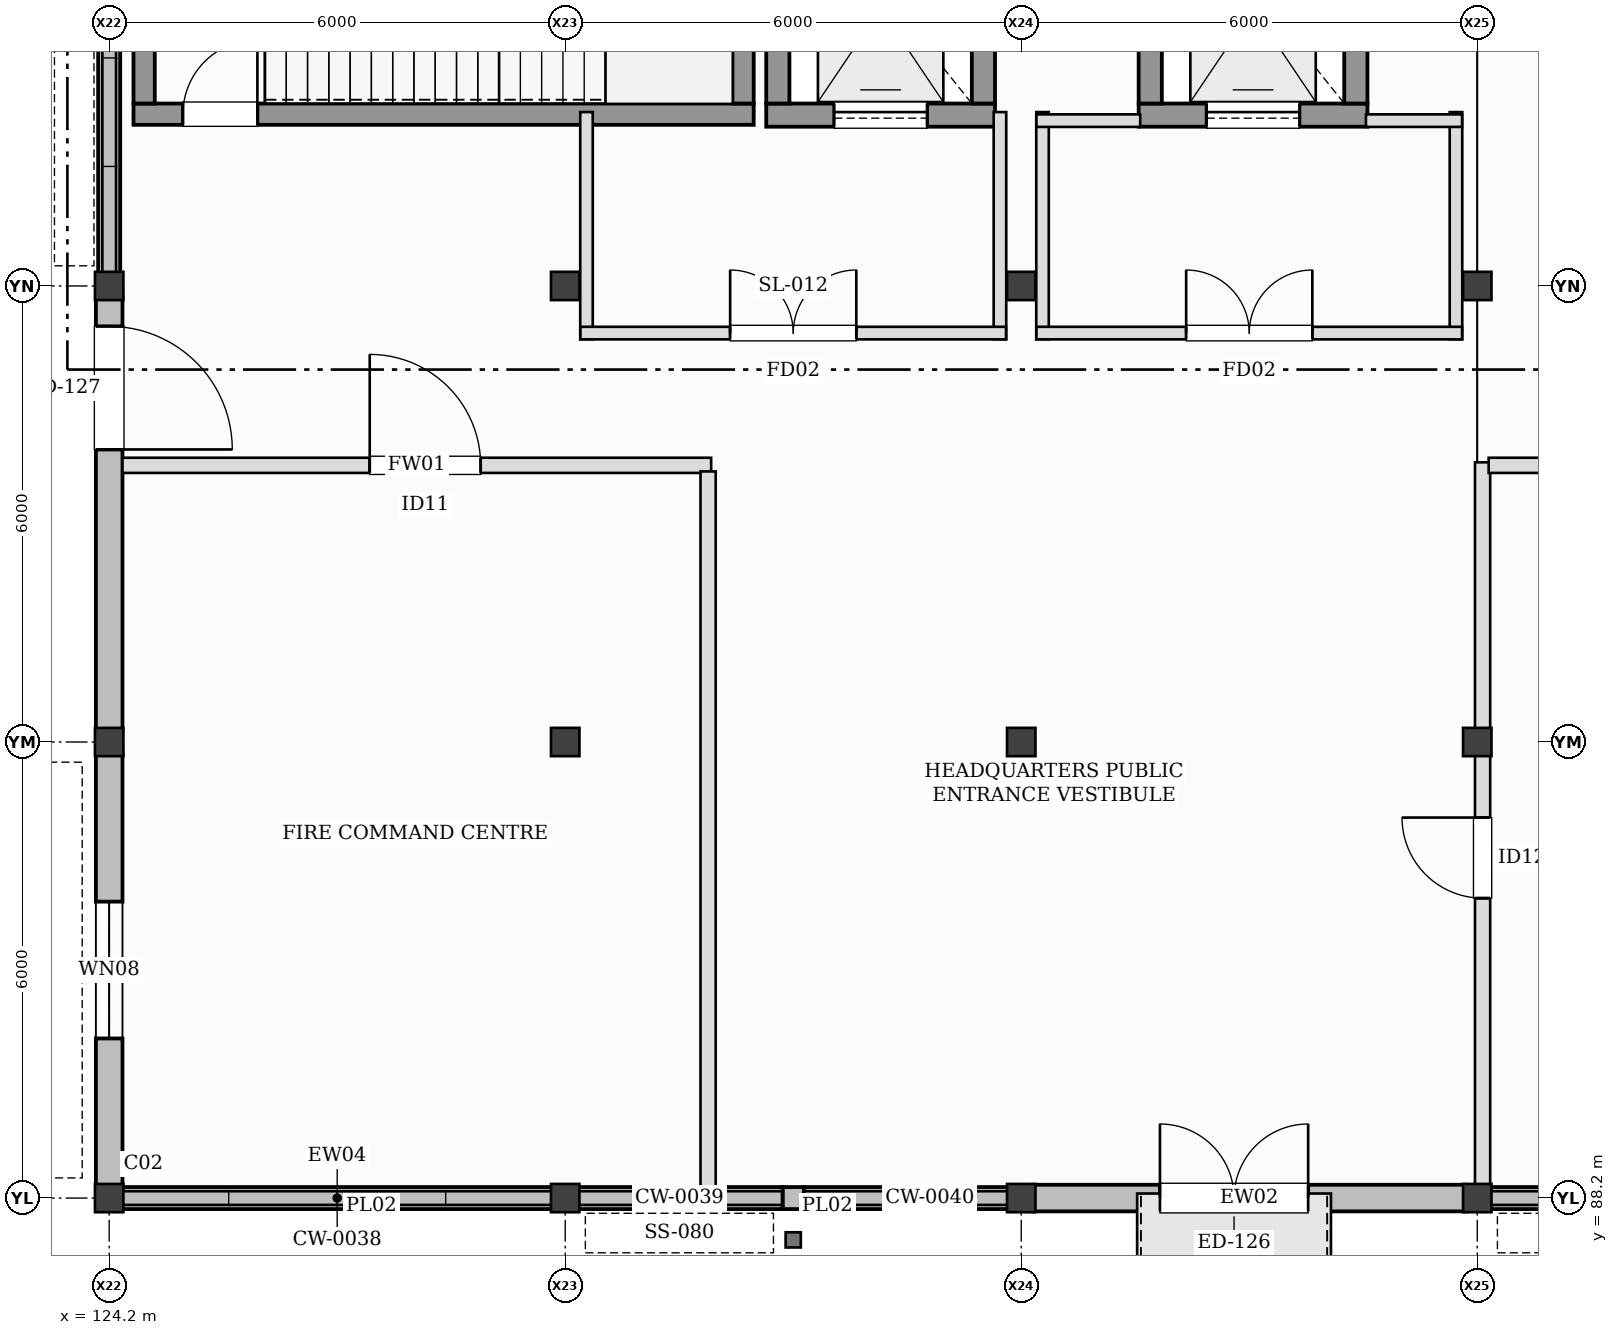
"""IFC4 building model, lengths in metres.
Left out: names, types, materials, properties, quantities, classifications, styles, units other than length and angle.
Written with IfcOpenShell. Run it as: python <this file> out.ifc"""

import sys

from ifc_helpers import new_model, si_unit, direction, frame, frame_2d, origin, origin_2d, place, context, subcontext, project, spatial, rectangle, hollow_rectangle, i_section, extrude, element, fill, save


model = new_model("IFC4")
c1 = context("Model", 3, precision=1e-05, world=origin(), true_north=direction((0.0, 1.0)))
c2 = subcontext(c1, "Body", "Model", "MODEL_VIEW")
j1 = project(units=[si_unit("LENGTHUNIT", "METRE"), si_unit("PLANEANGLEUNIT", "RADIAN")], contexts=[c1])
p1 = place(None, origin())
s1 = spatial("IfcSite", under=j1, at=p1, CompositionType="ELEMENT")
p2 = place(p1, origin())
s2 = spatial("IfcBuilding", under=s1, at=p2, CompositionType="ELEMENT")
p3 = place(p2, origin())
s3 = spatial("IfcBuildingStorey", under=s2, at=p3, CompositionType="ELEMENT", Elevation=0.0)
for number, where, z_axis, x_axis in (
    (1, (124.2, 88.2, 0.0), (0.0, 0.0, 1.0), (1.0, 0.0, 0.0)),
    (2, (124.2, 94.2, 0.0), (0.0, 0.0, 1.0), (1.0, 0.0, 0.0)),
    (3, (124.2, 100.2, 0.0), (0.0, 0.0, 1.0), (1.0, 0.0, 0.0)),
    (4, (130.2, 88.2, 0.0), (0.0, 0.0, 1.0), (1.0, 0.0, 0.0)),
    (5, (130.2, 94.2, 0.0), (0.0, 0.0, 1.0), (1.0, 0.0, 0.0)),
    (6, (130.2, 100.2, 0.0), (0.0, 0.0, 1.0), (1.0, 0.0, 0.0)),
    (7, (136.2, 88.2, 0.0), (0.0, 0.0, 1.0), (1.0, 0.0, 0.0)),
    (8, (136.2, 94.2, 0.0), (0.0, 0.0, 1.0), (1.0, 0.0, 0.0)),
    (9, (136.2, 100.2, 0.0), (0.0, 0.0, 1.0), (1.0, 0.0, 0.0)),
    (10, (142.2, 88.2, 0.0), (0.0, 0.0, 1.0), (1.0, 0.0, 0.0)),
    (11, (142.2, 94.2, 0.0), (0.0, 0.0, 1.0), (1.0, 0.0, 0.0)),
    (12, (142.2, 100.2, 0.0), (0.0, 0.0, 1.0), (1.0, 0.0, 0.0)),
):
    element("IfcColumn", number, at=place(p3, frame(where, z_axis=z_axis, x_axis=x_axis)), inside=s3, PredefinedType="COLUMN", context=c2, shape_type="SweptSolid", body=[
        extrude(i_section(OverallWidth=0.374, OverallDepth=0.372, WebThickness=0.016, FlangeThickness=0.026, at=origin_2d()), origin(), (0.0, 0.0, 1.0), 6.0),
    ])
for number, where, z_axis, x_axis in (
    (13, (127.2, 87.65, -0.35), (0.0, 0.0, 1.0), (1.0, 0.0, 0.0)),
    (14, (133.2, 87.65, -0.35), (0.0, 0.0, 1.0), (1.0, 0.0, 0.0)),
):
    element("IfcColumn", number, at=place(p3, frame(where, z_axis=z_axis, x_axis=x_axis)), inside=s3, PredefinedType="PILASTER", context=c2, shape_type="SweptSolid", body=[
        extrude(hollow_rectangle(XDim=0.2, YDim=0.2, WallThickness=0.01, at=origin_2d()), origin(), (0.0, 0.0, 1.0), 6.35),
    ])
p4 = place(p3, frame((124.345, 88.2, 0.0), z_axis=(0.0, 0.0, 1.0), x_axis=(1.0, 0.0, 0.0)))
e15 = element("IfcWall", 15, at=p4, inside=s3, PredefinedType="STANDARD", context=c2, shape_type="SweptSolid", body=[
    extrude(rectangle(XDim=5.71, YDim=0.29, at=frame_2d((2.855, 0.0))), origin(), (0.0, 0.0, 1.0), 0.68),
])
p5 = place(p3, frame((133.06, 88.2, 0.0), z_axis=(0.0, 0.0, 1.0), x_axis=(1.0, 0.0, 0.0)))
e16 = element("IfcWall", 16, at=p5, inside=s3, PredefinedType="STANDARD", context=c2, shape_type="SweptSolid", body=[
    extrude(rectangle(XDim=0.28, YDim=0.29, at=frame_2d((0.14, 0.0))), origin(), (0.0, 0.0, 1.0), 5.113),
])
p6 = place(p3, frame((130.345, 88.2, 0.0), z_axis=(0.0, 0.0, 1.0), x_axis=(1.0, 0.0, 0.0)))
e17 = element("IfcWall", 17, at=p6, inside=s3, PredefinedType="STANDARD", context=c2, shape_type="SweptSolid", body=[
    extrude(rectangle(XDim=2.715, YDim=0.29, at=frame_2d((1.357, 0.0))), origin(), (0.0, 0.0, 1.0), 0.8),
])
p7 = place(p3, frame((133.34, 88.2, 0.0), z_axis=(0.0, 0.0, 1.0), x_axis=(1.0, 0.0, 0.0)))
e18 = element("IfcWall", 18, at=p7, inside=s3, PredefinedType="STANDARD", context=c2, shape_type="SweptSolid", body=[
    extrude(rectangle(XDim=2.715, YDim=0.29, at=frame_2d((1.357, 0.0))), origin(), (0.0, 0.0, 1.0), 0.92),
])
p8 = place(p3, frame((136.345, 88.2, 0.0), z_axis=(0.0, 0.0, 1.0), x_axis=(1.0, 0.0, 0.0)))
e19 = element("IfcWall", 19, at=p8, inside=s3, PredefinedType="STANDARD", context=c2, shape_type="SweptSolid", body=[
    extrude(rectangle(XDim=5.71, YDim=0.35, at=frame_2d((2.855, 0.0))), origin(), (0.0, 0.0, 1.0), 5.113),
])
p9 = place(p8, frame((1.68, 0.0, 0.0)))
e20 = element("IfcOpeningElement", 20, at=p9, cuts=e19, PredefinedType="OPENING", context=c2, shape_type="SweptSolid", body=[
    extrude(rectangle(XDim=1.95, YDim=2.35, at=frame_2d((0.975, 1.175))), frame((0.0, 0.185, 0.0), z_axis=(0.0, -1.0, 0.0), x_axis=(1.0, 0.0, 0.0)), (0.0, 0.0, 1.0), 0.37),
])
p10 = place(p3, frame((142.345, 88.2, 0.0), z_axis=(0.0, 0.0, 1.0), x_axis=(1.0, 0.0, 0.0)))
e21 = element("IfcWall", 21, at=p10, inside=s3, PredefinedType="STANDARD", context=c2, shape_type="SweptSolid", body=[
    extrude(rectangle(XDim=2.715, YDim=0.29, at=frame_2d((1.357, 0.0))), origin(), (0.0, 0.0, 1.0), 0.32),
])
p11 = place(p3, frame((124.2, 94.055, 0.0), z_axis=(0.0, 0.0, 1.0), x_axis=(0.0, -1.0, 0.0)))
e22 = element("IfcWall", 22, at=p11, inside=s3, PredefinedType="STANDARD", context=c2, shape_type="SweptSolid", body=[
    extrude(rectangle(XDim=5.71, YDim=0.35, at=frame_2d((2.855, 0.0))), origin(), (0.0, 0.0, 1.0), 5.044),
])
p12 = place(p11, frame((1.955, 0.0, 1.0)))
e23 = element("IfcOpeningElement", 23, at=p12, cuts=e22, PredefinedType="OPENING", context=c2, shape_type="SweptSolid", body=[
    extrude(rectangle(XDim=1.8, YDim=1.36, at=frame_2d((0.9, 0.68))), frame((0.0, 0.185, 0.0), z_axis=(0.0, -1.0, 0.0), x_axis=(1.0, 0.0, 0.0)), (0.0, 0.0, 1.0), 0.37),
])
p13 = place(p3, frame((124.2, 100.055, 0.0), z_axis=(0.0, 0.0, 1.0), x_axis=(0.0, -1.0, 0.0)))
e24 = element("IfcWall", 24, at=p13, inside=s3, PredefinedType="STANDARD", context=c2, shape_type="SweptSolid", body=[
    extrude(rectangle(XDim=5.71, YDim=0.35, at=frame_2d((2.855, 0.0))), origin(), (0.0, 0.0, 1.0), 5.044),
])
p14 = place(p13, frame((0.386, 0.0, 0.0)))
e25 = element("IfcOpeningElement", 25, at=p14, cuts=e24, PredefinedType="OPENING", context=c2, shape_type="SweptSolid", body=[
    extrude(rectangle(XDim=1.62, YDim=2.2, at=frame_2d((0.81, 1.1))), frame((0.0, 0.185, 0.0), z_axis=(0.0, -1.0, 0.0), x_axis=(1.0, 0.0, 0.0)), (0.0, 0.0, 1.0), 0.37),
])
p15 = place(p3, frame((124.2, 106.055, 0.0), z_axis=(0.0, 0.0, 1.0), x_axis=(0.0, -1.0, 0.0)))
e26 = element("IfcWall", 26, at=p15, inside=s3, PredefinedType="STANDARD", context=c2, shape_type="SweptSolid", body=[
    extrude(rectangle(XDim=5.71, YDim=0.29, at=frame_2d((2.855, 0.0))), origin(), (0.0, 0.0, 1.0), 0.56),
])
p16 = place(p3, frame((124.52, 102.46, 0.0), z_axis=(0.0, 0.0, 1.0), x_axis=(1.0, 0.0, 0.0)))
e27 = element("IfcWall", 27, at=p16, inside=s3, PredefinedType="SHEAR", context=c2, shape_type="SweptSolid", body=[
    extrude(rectangle(XDim=8.16, YDim=0.28, at=frame_2d((4.08, 0.0))), origin(), (0.0, 0.0, 1.0), 6.0),
])
p17 = place(p16, frame((0.65, 0.0, 0.0)))
e28 = element("IfcOpeningElement", 28, at=p17, cuts=e27, PredefinedType="OPENING", context=c2, shape_type="SweptSolid", body=[
    extrude(rectangle(XDim=0.98, YDim=2.15, at=frame_2d((0.49, 1.075))), frame((0.0, 0.15, 0.0), z_axis=(0.0, -1.0, 0.0), x_axis=(1.0, 0.0, 0.0)), (0.0, 0.0, 1.0), 0.3),
])
for number, where, z_axis, x_axis in (
    (29, (124.66, 105.6, 0.0), (0.0, 0.0, 1.0), (0.0, -1.0, 0.0)),
    (30, (132.54, 102.6, 0.0), (0.0, 0.0, 1.0), (0.0, 1.0, 0.0)),
):
    element("IfcWall", number, at=place(p3, frame(where, z_axis=z_axis, x_axis=x_axis)), inside=s3, PredefinedType="SHEAR", context=c2, shape_type="SweptSolid", body=[
        extrude(rectangle(XDim=3.0, YDim=0.28, at=frame_2d((1.5, 0.0))), origin(), (0.0, 0.0, 1.0), 6.0),
    ])
p18 = place(p3, frame((132.845, 102.448, 0.0), z_axis=(0.0, 0.0, 1.0), x_axis=(1.0, 0.0, 0.0)))
e31 = element("IfcWall", 31, at=p18, inside=s3, PredefinedType="SHEAR", context=c2, shape_type="SweptSolid", body=[
    extrude(rectangle(XDim=3.01, YDim=0.305, at=frame_2d((1.505, 0.0))), origin(), (0.0, 0.0, 1.0), 6.0),
])
p19 = place(p18, frame((0.895, 0.0, 0.0)))
e32 = element("IfcOpeningElement", 32, at=p19, cuts=e31, PredefinedType="OPENING", context=c2, shape_type="SweptSolid", body=[
    extrude(rectangle(XDim=1.22, YDim=2.22, at=frame_2d((0.61, 1.11))), frame((0.0, 0.162, 0.0), z_axis=(0.0, -1.0, 0.0), x_axis=(1.0, 0.0, 0.0)), (0.0, 0.0, 1.0), 0.325),
])
for number, where, z_axis, x_axis in (
    (33, (132.998, 105.6, 0.0), (0.0, 0.0, 1.0), (0.0, -1.0, 0.0)),
    (34, (135.702, 102.6, 0.0), (0.0, 0.0, 1.0), (0.0, 1.0, 0.0)),
):
    element("IfcWall", number, at=place(p3, frame(where, z_axis=z_axis, x_axis=x_axis)), inside=s3, PredefinedType="SHEAR", context=c2, shape_type="SweptSolid", body=[
        extrude(rectangle(XDim=3.0, YDim=0.305, at=frame_2d((1.5, 0.0))), origin(), (0.0, 0.0, 1.0), 6.0),
    ])
for number, where, z_axis, x_axis in (
    (35, (130.48, 99.5, 0.0), (0.0, 0.0, 1.0), (0.0, 1.0, 0.0)),
    (36, (135.92, 102.488, 0.0), (0.0, 0.0, 1.0), (0.0, -1.0, 0.0)),
):
    element("IfcWall", number, at=place(p3, frame(where, z_axis=z_axis, x_axis=x_axis)), inside=s3, PredefinedType="PARTITIONING", context=c2, shape_type="SweptSolid", body=[
        extrude(rectangle(XDim=2.988, YDim=0.165, at=frame_2d((1.494, 0.0))), origin(), (0.0, 0.0, 1.0), 5.044),
    ])
p20 = place(p3, frame((130.4, 99.58, 0.0), z_axis=(0.0, 0.0, 1.0), x_axis=(1.0, 0.0, 0.0)))
e37 = element("IfcWall", 37, at=p20, inside=s3, PredefinedType="PARTITIONING", context=c2, shape_type="SweptSolid", body=[
    extrude(rectangle(XDim=5.6, YDim=0.165, at=frame_2d((2.8, 0.0))), origin(), (0.0, 0.0, 1.0), 5.68),
])
p21 = place(p20, frame((1.97, 0.0, 0.0)))
e38 = element("IfcOpeningElement", 38, at=p21, cuts=e37, PredefinedType="OPENING", context=c2, shape_type="SweptSolid", body=[
    extrude(rectangle(XDim=1.66, YDim=2.2, at=frame_2d((0.83, 1.1))), frame((0.0, 0.093, 0.0), z_axis=(0.0, -1.0, 0.0), x_axis=(1.0, 0.0, 0.0)), (0.0, 0.0, 1.0), 0.185),
])
p22 = place(p3, frame((137.745, 102.448, 0.0), z_axis=(0.0, 0.0, 1.0), x_axis=(1.0, 0.0, 0.0)))
e39 = element("IfcWall", 39, at=p22, inside=s3, PredefinedType="SHEAR", context=c2, shape_type="SweptSolid", body=[
    extrude(rectangle(XDim=3.01, YDim=0.305, at=frame_2d((1.505, 0.0))), origin(), (0.0, 0.0, 1.0), 6.0),
])
p23 = place(p22, frame((0.895, 0.0, 0.0)))
e40 = element("IfcOpeningElement", 40, at=p23, cuts=e39, PredefinedType="OPENING", context=c2, shape_type="SweptSolid", body=[
    extrude(rectangle(XDim=1.22, YDim=2.22, at=frame_2d((0.61, 1.11))), frame((0.0, 0.162, 0.0), z_axis=(0.0, -1.0, 0.0), x_axis=(1.0, 0.0, 0.0)), (0.0, 0.0, 1.0), 0.325),
])
for number, where, z_axis, x_axis in (
    (41, (137.897, 105.6, 0.0), (0.0, 0.0, 1.0), (0.0, -1.0, 0.0)),
    (42, (140.603, 102.6, 0.0), (0.0, 0.0, 1.0), (0.0, 1.0, 0.0)),
):
    element("IfcWall", number, at=place(p3, frame(where, z_axis=z_axis, x_axis=x_axis)), inside=s3, PredefinedType="SHEAR", context=c2, shape_type="SweptSolid", body=[
        extrude(rectangle(XDim=3.0, YDim=0.305, at=frame_2d((1.5, 0.0))), origin(), (0.0, 0.0, 1.0), 6.0),
    ])
for number, where, z_axis, x_axis in (
    (43, (136.48, 99.5, 0.0), (0.0, 0.0, 1.0), (0.0, 1.0, 0.0)),
    (44, (141.92, 102.488, 0.0), (0.0, 0.0, 1.0), (0.0, -1.0, 0.0)),
):
    element("IfcWall", number, at=place(p3, frame(where, z_axis=z_axis, x_axis=x_axis)), inside=s3, PredefinedType="PARTITIONING", context=c2, shape_type="SweptSolid", body=[
        extrude(rectangle(XDim=2.988, YDim=0.165, at=frame_2d((1.494, 0.0))), origin(), (0.0, 0.0, 1.0), 5.044),
    ])
p24 = place(p3, frame((136.4, 102.375, 0.0), z_axis=(0.0, 0.0, 1.0), x_axis=(1.0, 0.0, 0.0)))
e45 = element("IfcWall", 45, at=p24, inside=s3, PredefinedType="PARTITIONING", context=c2, shape_type="SweptSolid", body=[
    extrude(rectangle(XDim=1.365, YDim=0.165, at=frame_2d((0.683, 0.0))), origin(), (0.0, 0.0, 1.0), 5.68),
])
p25 = place(p3, frame((140.735, 102.375, 0.0), z_axis=(0.0, 0.0, 1.0), x_axis=(1.0, 0.0, 0.0)))
e46 = element("IfcWall", 46, at=p25, inside=s3, PredefinedType="PARTITIONING", context=c2, shape_type="SweptSolid", body=[
    extrude(rectangle(XDim=1.265, YDim=0.165, at=frame_2d((0.632, 0.0))), origin(), (0.0, 0.0, 1.0), 5.68),
])
p26 = place(p3, frame((136.4, 99.58, 0.0), z_axis=(0.0, 0.0, 1.0), x_axis=(1.0, 0.0, 0.0)))
e47 = element("IfcWall", 47, at=p26, inside=s3, PredefinedType="PARTITIONING", context=c2, shape_type="SweptSolid", body=[
    extrude(rectangle(XDim=5.6, YDim=0.165, at=frame_2d((2.8, 0.0))), origin(), (0.0, 0.0, 1.0), 5.68),
])
p27 = place(p26, frame((1.97, 0.0, 0.0)))
e48 = element("IfcOpeningElement", 48, at=p27, cuts=e47, PredefinedType="OPENING", context=c2, shape_type="SweptSolid", body=[
    extrude(rectangle(XDim=1.66, YDim=2.2, at=frame_2d((0.83, 1.1))), frame((0.0, 0.093, 0.0), z_axis=(0.0, -1.0, 0.0), x_axis=(1.0, 0.0, 0.0)), (0.0, 0.0, 1.0), 0.185),
])
p28 = place(p3, frame((124.375, 97.84, 0.0), z_axis=(0.0, 0.0, 1.0), x_axis=(1.0, 0.0, 0.0)))
e49 = element("IfcWall", 49, at=p28, inside=s3, PredefinedType="PARTITIONING", context=c2, shape_type="SweptSolid", body=[
    extrude(rectangle(XDim=7.745, YDim=0.2, at=frame_2d((3.873, 0.0))), origin(), (0.0, 0.0, 1.0), 5.68),
])
p29 = place(p28, frame((3.253, 0.0, 0.0)))
e50 = element("IfcOpeningElement", 50, at=p29, cuts=e49, PredefinedType="OPENING", context=c2, shape_type="SweptSolid", body=[
    extrude(rectangle(XDim=1.46, YDim=2.3, at=frame_2d((0.73, 1.15))), frame((0.0, 0.11, 0.0), z_axis=(0.0, -1.0, 0.0), x_axis=(1.0, 0.0, 0.0)), (0.0, 0.0, 1.0), 0.22),
])
p30 = place(p3, frame((132.08, 97.76, 0.0), z_axis=(0.0, 0.0, 1.0), x_axis=(0.0, -1.0, 0.0)))
e51 = element("IfcWall", 51, at=p30, inside=s3, PredefinedType="PARTITIONING", context=c2, shape_type="SweptSolid", body=[
    extrude(rectangle(XDim=9.415, YDim=0.2, at=frame_2d((4.708, 0.0))), origin(), (0.0, 0.0, 1.0), 5.249),
])
p31 = place(p3, frame((142.27, 88.375, 0.0), z_axis=(0.0, 0.0, 1.0), x_axis=(0.0, 1.0, 0.0)))
e52 = element("IfcWall", 52, at=p31, inside=s3, PredefinedType="PARTITIONING", context=c2, shape_type="SweptSolid", body=[
    extrude(rectangle(XDim=9.505, YDim=0.2, at=frame_2d((4.752, 0.0))), origin(), (0.0, 0.0, 1.0), 5.044),
])
p32 = place(p31, frame((3.771, 0.0, 0.0)))
e53 = element("IfcOpeningElement", 53, at=p32, cuts=e52, PredefinedType="OPENING", context=c2, shape_type="SweptSolid", body=[
    extrude(rectangle(XDim=1.06, YDim=2.25, at=frame_2d((0.53, 1.125))), frame((0.0, 0.11, 0.0), z_axis=(0.0, -1.0, 0.0), x_axis=(1.0, 0.0, 0.0)), (0.0, 0.0, 1.0), 0.22),
])
p33 = place(p3, frame((142.35, 97.84, 0.0), z_axis=(0.0, 0.0, 1.0), x_axis=(1.0, 0.0, 0.0)))
e54 = element("IfcWall", 54, at=p33, inside=s3, PredefinedType="PARTITIONING", context=c2, shape_type="SweptSolid", body=[
    extrude(rectangle(XDim=11.77, YDim=0.2, at=frame_2d((5.885, 0.0))), origin(), (0.0, 0.0, 1.0), 5.68),
])
p34 = place(p9, frame((1.95, 0.0, 0.0), z_axis=(0.0, 0.0, 1.0), x_axis=(-1.0, 0.0, 0.0)))
e55 = element("IfcDoor", 55, at=p34, inside=s3, OperationType="DOUBLE_DOOR_SINGLE_SWING", PredefinedType="DOOR", context=c2, shape_type="SweptSolid", body=[
    extrude(rectangle(XDim=1.95, YDim=2.35, at=frame_2d((0.975, 1.175))), frame((0.0, 0.025, 0.0), z_axis=(0.0, -1.0, 0.0), x_axis=(1.0, 0.0, 0.0)), (0.0, 0.0, 1.0), 0.05),
])
fill(e20, e55)
p35 = place(p12, origin())
e56 = element("IfcWindow", 56, at=p35, inside=s3, PartitioningType="SINGLE_PANEL", PredefinedType="WINDOW", context=c2, shape_type="SweptSolid", body=[
    extrude(rectangle(XDim=1.8, YDim=1.36, at=frame_2d((0.9, 0.68))), frame((0.0, 0.03, 0.0), z_axis=(0.0, -1.0, 0.0), x_axis=(1.0, 0.0, 0.0)), (0.0, 0.0, 1.0), 0.06),
])
fill(e23, e56)
p36 = place(p14, frame((1.62, 0.0, 0.0), z_axis=(0.0, 0.0, 1.0), x_axis=(-1.0, 0.0, 0.0)))
e57 = element("IfcDoor", 57, at=p36, inside=s3, OperationType="SINGLE_SWING_RIGHT", PredefinedType="DOOR", context=c2, shape_type="SweptSolid", body=[
    extrude(rectangle(XDim=1.62, YDim=2.2, at=frame_2d((0.81, 1.1))), frame((0.0, 0.025, 0.0), z_axis=(0.0, -1.0, 0.0), x_axis=(1.0, 0.0, 0.0)), (0.0, 0.0, 1.0), 0.05),
])
fill(e25, e57)
p37 = place(p17, origin())
e58 = element("IfcDoor", 58, at=p37, inside=s3, OperationType="SINGLE_SWING_RIGHT", PredefinedType="DOOR", context=c2, shape_type="SweptSolid", body=[
    extrude(rectangle(XDim=0.98, YDim=2.15, at=frame_2d((0.49, 1.075))), frame((0.0, 0.025, 0.0), z_axis=(0.0, -1.0, 0.0), x_axis=(1.0, 0.0, 0.0)), (0.0, 0.0, 1.0), 0.05),
])
fill(e28, e58)
p38 = place(p19, origin())
e59 = element("IfcDoor", 59, at=p38, inside=s3, OperationType="SLIDING_TO_LEFT", PredefinedType="DOOR", context=c2, shape_type="SweptSolid", body=[
    extrude(rectangle(XDim=1.22, YDim=2.22, at=frame_2d((0.61, 1.11))), frame((0.0, 0.025, 0.0), z_axis=(0.0, -1.0, 0.0), x_axis=(1.0, 0.0, 0.0)), (0.0, 0.0, 1.0), 0.05),
])
fill(e32, e59)
p39 = place(p21, frame((1.66, 0.0, 0.0), z_axis=(0.0, 0.0, 1.0), x_axis=(-1.0, 0.0, 0.0)))
e60 = element("IfcDoor", 60, at=p39, inside=s3, OperationType="DOUBLE_DOOR_SINGLE_SWING", PredefinedType="DOOR", context=c2, shape_type="SweptSolid", body=[
    extrude(rectangle(XDim=1.66, YDim=2.2, at=frame_2d((0.83, 1.1))), frame((0.0, 0.025, 0.0), z_axis=(0.0, -1.0, 0.0), x_axis=(1.0, 0.0, 0.0)), (0.0, 0.0, 1.0), 0.05),
])
fill(e38, e60)
p40 = place(p23, origin())
e61 = element("IfcDoor", 61, at=p40, inside=s3, OperationType="SLIDING_TO_LEFT", PredefinedType="DOOR", context=c2, shape_type="SweptSolid", body=[
    extrude(rectangle(XDim=1.22, YDim=2.22, at=frame_2d((0.61, 1.11))), frame((0.0, 0.025, 0.0), z_axis=(0.0, -1.0, 0.0), x_axis=(1.0, 0.0, 0.0)), (0.0, 0.0, 1.0), 0.05),
])
fill(e40, e61)
p41 = place(p27, frame((1.66, 0.0, 0.0), z_axis=(0.0, 0.0, 1.0), x_axis=(-1.0, 0.0, 0.0)))
e62 = element("IfcDoor", 62, at=p41, inside=s3, OperationType="DOUBLE_DOOR_SINGLE_SWING", PredefinedType="DOOR", context=c2, shape_type="SweptSolid", body=[
    extrude(rectangle(XDim=1.66, YDim=2.2, at=frame_2d((0.83, 1.1))), frame((0.0, 0.025, 0.0), z_axis=(0.0, -1.0, 0.0), x_axis=(1.0, 0.0, 0.0)), (0.0, 0.0, 1.0), 0.05),
])
fill(e48, e62)
p42 = place(p29, frame((1.46, 0.0, 0.0), z_axis=(0.0, 0.0, 1.0), x_axis=(-1.0, 0.0, 0.0)))
e63 = element("IfcDoor", 63, at=p42, inside=s3, OperationType="SINGLE_SWING_LEFT", PredefinedType="DOOR", context=c2, shape_type="SweptSolid", body=[
    extrude(rectangle(XDim=1.46, YDim=2.3, at=frame_2d((0.73, 1.15))), frame((0.0, 0.025, 0.0), z_axis=(0.0, -1.0, 0.0), x_axis=(1.0, 0.0, 0.0)), (0.0, 0.0, 1.0), 0.05),
])
fill(e50, e63)
p43 = place(p32, frame((1.06, 0.0, 0.0), z_axis=(0.0, 0.0, 1.0), x_axis=(-1.0, 0.0, 0.0)))
e64 = element("IfcDoor", 64, at=p43, inside=s3, OperationType="SINGLE_SWING_RIGHT", PredefinedType="DOOR", context=c2, shape_type="SweptSolid", body=[
    extrude(rectangle(XDim=1.06, YDim=2.25, at=frame_2d((0.53, 1.125))), frame((0.0, 0.025, 0.0), z_axis=(0.0, -1.0, 0.0), x_axis=(1.0, 0.0, 0.0)), (0.0, 0.0, 1.0), 0.05),
])
fill(e53, e64)
save(model, sys.argv[1])
